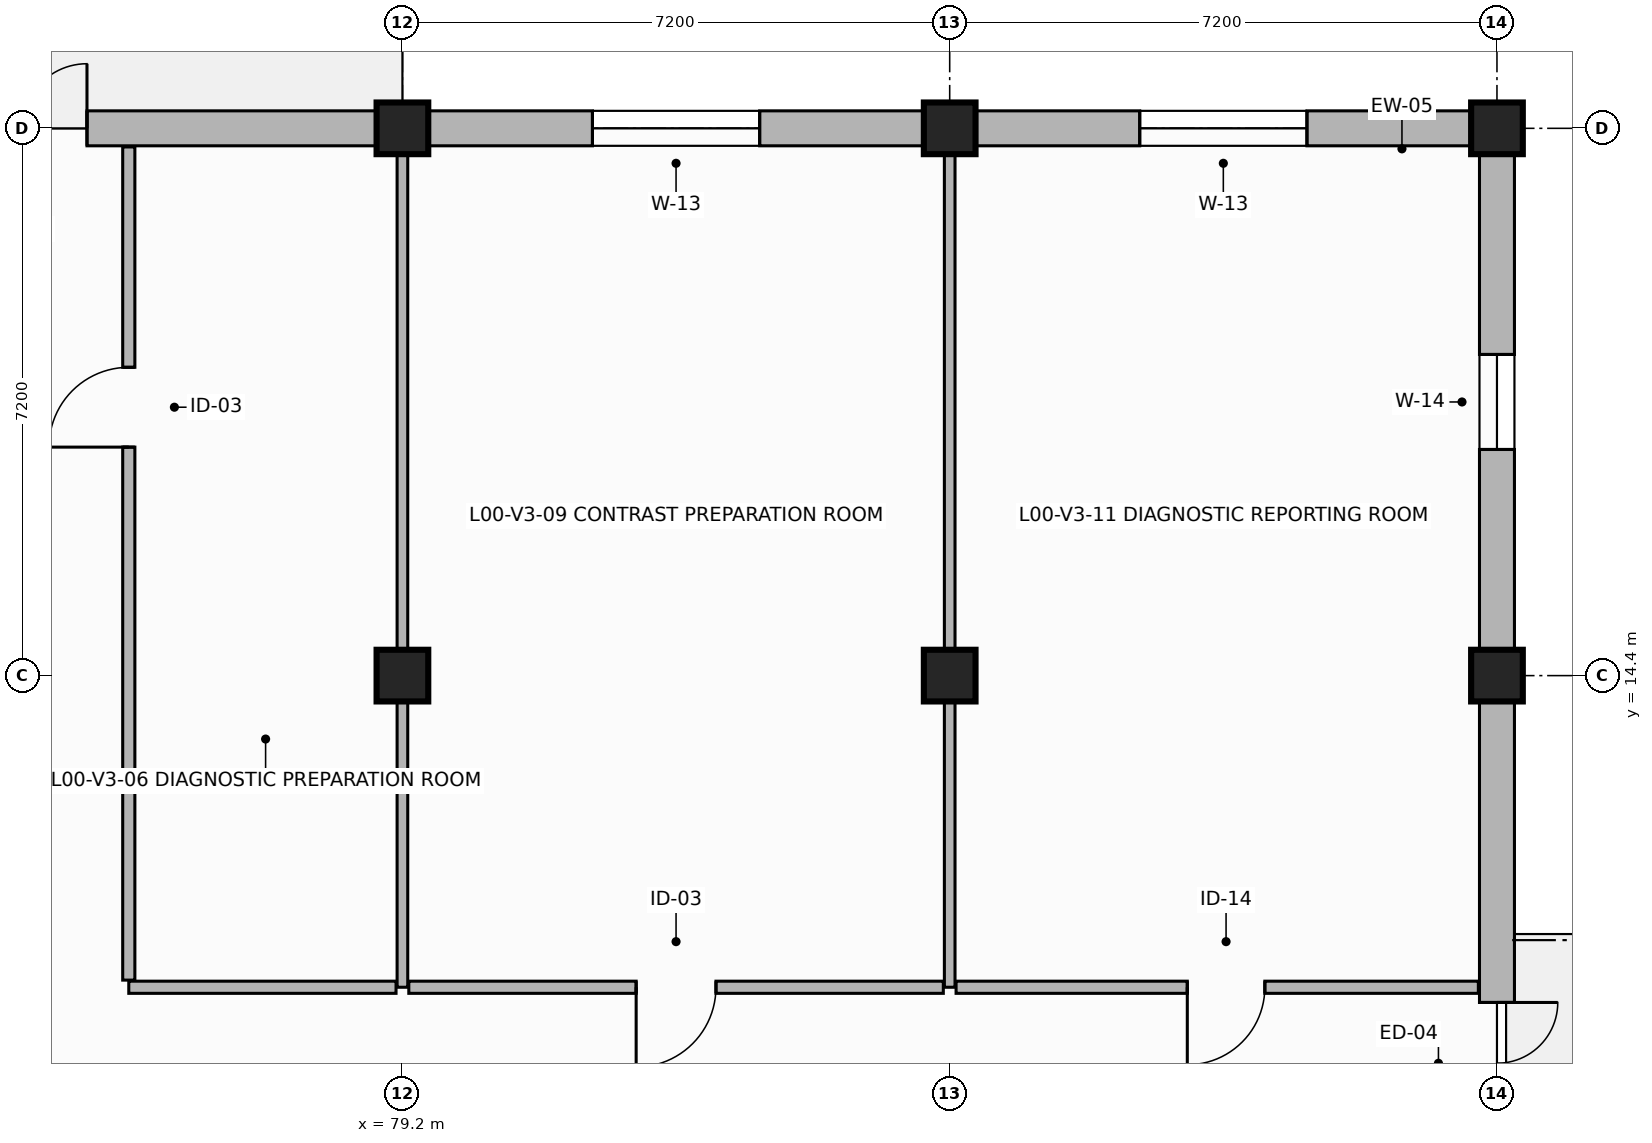
"""IFC4 building model, lengths in metres.
Left out: names, types, materials, properties, quantities, classifications, styles, units other than length and angle.
Written with IfcOpenShell. Run it as: python <this file> out.ifc"""

import sys

from ifc_helpers import new_model, si_unit, direction, frame, frame_2d, origin, origin_2d, place, context, subcontext, project, spatial, rectangle, extrude, element, fill, save


model = new_model("IFC4")
c1 = context("Model", 3, precision=1e-05, world=origin(), true_north=direction((0.0, 1.0)))
c2 = subcontext(c1, "Body", "Model", "MODEL_VIEW")
j1 = project(units=[si_unit("LENGTHUNIT", "METRE"), si_unit("PLANEANGLEUNIT", "RADIAN")], contexts=[c1])
p1 = place(None, origin())
s1 = spatial("IfcSite", under=j1, at=p1, CompositionType="ELEMENT")
p2 = place(p1, origin())
s2 = spatial("IfcBuilding", under=s1, at=p2, CompositionType="ELEMENT")
p3 = place(p2, origin())
s3 = spatial("IfcBuildingStorey", under=s2, at=p3, CompositionType="ELEMENT", Elevation=0.0)
for number, where, z_axis, x_axis in (
    (1, (79.2, 14.4, 0.0), (0.0, 0.0, 1.0), (1.0, 0.0, 0.0)),
    (2, (79.2, 21.6, 0.0), (0.0, 0.0, 1.0), (1.0, 0.0, 0.0)),
    (3, (86.4, 14.4, 0.0), (0.0, 0.0, 1.0), (1.0, 0.0, 0.0)),
    (4, (86.4, 21.6, 0.0), (0.0, 0.0, 1.0), (1.0, 0.0, 0.0)),
    (5, (93.6, 14.4, 0.0), (0.0, 0.0, 1.0), (1.0, 0.0, 0.0)),
    (6, (93.6, 21.6, 0.0), (0.0, 0.0, 1.0), (1.0, 0.0, 0.0)),
):
    element("IfcColumn", number, at=place(p3, frame(where, z_axis=z_axis, x_axis=x_axis)), inside=s3, PredefinedType="COLUMN", context=c2, shape_type="SweptSolid", body=[
        extrude(rectangle(XDim=0.68, YDim=0.68, at=origin_2d()), origin(), (0.0, 0.0, 1.0), 4.15),
    ])
p4 = place(p3, frame((93.6, 7.2, 0.0), z_axis=(0.0, 0.0, 1.0), x_axis=(0.0, 1.0, 0.0)))
e7 = element("IfcWall", 7, at=p4, inside=s3, PredefinedType="SOLIDWALL", context=c2, shape_type="SweptSolid", body=[
    extrude(rectangle(XDim=7.2, YDim=0.46, at=frame_2d((3.6, 0.0))), origin(), (0.0, 0.0, 1.0), 3.43),
])
p5 = place(p4, frame((1.3, 0.0, 0.0)))
e8 = element("IfcOpeningElement", 8, at=p5, cuts=e7, PredefinedType="OPENING", context=c2, shape_type="SweptSolid", body=[
    extrude(rectangle(XDim=1.6, YDim=2.4, at=frame_2d((0.8, 1.2))), frame((0.0, 0.24, 0.0), z_axis=(0.0, -1.0, 0.0), x_axis=(1.0, 0.0, 0.0)), (0.0, 0.0, 1.0), 0.48),
])
p6 = place(p3, frame((93.6, 14.4, 0.0), z_axis=(0.0, 0.0, 1.0), x_axis=(0.0, 1.0, 0.0)))
e9 = element("IfcWall", 9, at=p6, inside=s3, PredefinedType="SOLIDWALL", context=c2, shape_type="SweptSolid", body=[
    extrude(rectangle(XDim=7.2, YDim=0.46, at=frame_2d((3.6, 0.0))), origin(), (0.0, 0.0, 1.0), 3.43),
])
p7 = place(p6, frame((2.975, 0.0, 1.2)))
e10 = element("IfcOpeningElement", 10, at=p7, cuts=e9, PredefinedType="OPENING", context=c2, shape_type="SweptSolid", body=[
    extrude(rectangle(XDim=1.25, YDim=1.35, at=frame_2d((0.625, 0.675))), frame((0.0, 0.24, 0.0), z_axis=(0.0, -1.0, 0.0), x_axis=(1.0, 0.0, 0.0)), (0.0, 0.0, 1.0), 0.48),
])
p8 = place(p3, frame((93.6, 21.6, 0.0), z_axis=(0.0, 0.0, 1.0), x_axis=(-1.0, 0.0, 0.0)))
e11 = element("IfcWall", 11, at=p8, inside=s3, PredefinedType="SOLIDWALL", context=c2, shape_type="SweptSolid", body=[
    extrude(rectangle(XDim=7.2, YDim=0.46, at=frame_2d((3.6, 0.0))), origin(), (0.0, 0.0, 1.0), 3.43),
])
p9 = place(p8, frame((2.5, 0.0, 1.2)))
e12 = element("IfcOpeningElement", 12, at=p9, cuts=e11, PredefinedType="OPENING", context=c2, shape_type="SweptSolid", body=[
    extrude(rectangle(XDim=2.2, YDim=1.1, at=frame_2d((1.1, 0.55))), frame((0.0, 0.24, 0.0), z_axis=(0.0, -1.0, 0.0), x_axis=(1.0, 0.0, 0.0)), (0.0, 0.0, 1.0), 0.48),
])
p10 = place(p3, frame((86.4, 21.6, 0.0), z_axis=(0.0, 0.0, 1.0), x_axis=(-1.0, 0.0, 0.0)))
e13 = element("IfcWall", 13, at=p10, inside=s3, PredefinedType="SOLIDWALL", context=c2, shape_type="SweptSolid", body=[
    extrude(rectangle(XDim=7.2, YDim=0.46, at=frame_2d((3.6, 0.0))), origin(), (0.0, 0.0, 1.0), 3.43),
])
p11 = place(p10, frame((2.5, 0.0, 1.2)))
e14 = element("IfcOpeningElement", 14, at=p11, cuts=e13, PredefinedType="OPENING", context=c2, shape_type="SweptSolid", body=[
    extrude(rectangle(XDim=2.2, YDim=1.1, at=frame_2d((1.1, 0.55))), frame((0.0, 0.24, 0.0), z_axis=(0.0, -1.0, 0.0), x_axis=(1.0, 0.0, 0.0)), (0.0, 0.0, 1.0), 0.48),
])
p12 = place(p3, frame((79.2, 21.6, 0.0), z_axis=(0.0, 0.0, 1.0), x_axis=(-1.0, 0.0, 0.0)))
e15 = element("IfcWall", 15, at=p12, inside=s3, PredefinedType="SOLIDWALL", context=c2, shape_type="SweptSolid", body=[
    extrude(rectangle(XDim=7.2, YDim=0.46, at=frame_2d((3.6, 0.0))), origin(), (0.0, 0.0, 1.0), 3.43),
])
p13 = place(p12, frame((4.15, 0.0, 0.0)))
e16 = element("IfcOpeningElement", 16, at=p13, cuts=e15, PredefinedType="OPENING", context=c2, shape_type="SweptSolid", body=[
    extrude(rectangle(XDim=1.7, YDim=2.45, at=frame_2d((0.85, 1.225))), frame((0.0, 0.24, 0.0), z_axis=(0.0, -1.0, 0.0), x_axis=(1.0, 0.0, 0.0)), (0.0, 0.0, 1.0), 0.48),
])
p14 = place(p3, frame((79.2, 21.355, 0.0), z_axis=(0.0, 0.0, 1.0), x_axis=(0.0, -1.0, 0.0)))
e17 = element("IfcWall", 17, at=p14, inside=s3, PredefinedType="PARTITIONING", context=c2, shape_type="SweptSolid", body=[
    extrude(rectangle(XDim=11.055, YDim=0.14, at=frame_2d((5.527, 0.0))), origin(), (0.0, 0.0, 1.0), 3.41),
])
p15 = place(p3, frame((79.116, 10.3, 0.0), z_axis=(0.0, 0.0, 1.0), x_axis=(-1.0, 0.0, 0.0)))
e18 = element("IfcWall", 18, at=p15, inside=s3, PredefinedType="PARTITIONING", context=c2, shape_type="SweptSolid", body=[
    extrude(rectangle(XDim=3.516, YDim=0.16, at=frame_2d((1.758, 0.0))), origin(), (0.0, 0.0, 1.0), 3.41),
])
p16 = place(p3, frame((75.6, 10.394, 0.0), z_axis=(0.0, 0.0, 1.0), x_axis=(0.0, 1.0, 0.0)))
e19 = element("IfcWall", 19, at=p16, inside=s3, PredefinedType="PARTITIONING", context=c2, shape_type="SweptSolid", body=[
    extrude(rectangle(XDim=10.961, YDim=0.16, at=frame_2d((5.48, 0.0))), origin(), (0.0, 0.0, 1.0), 3.41),
])
p17 = place(p16, frame((7.012, 0.0, 0.0)))
e20 = element("IfcOpeningElement", 20, at=p17, cuts=e19, PredefinedType="OPENING", context=c2, shape_type="SweptSolid", body=[
    extrude(rectangle(XDim=1.05, YDim=2.15, at=frame_2d((0.525, 1.075))), frame((0.0, 0.09, 0.0), z_axis=(0.0, -1.0, 0.0), x_axis=(1.0, 0.0, 0.0)), (0.0, 0.0, 1.0), 0.18),
])
p18 = place(p3, frame((86.4, 21.355, 0.0), z_axis=(0.0, 0.0, 1.0), x_axis=(0.0, -1.0, 0.0)))
e21 = element("IfcWall", 21, at=p18, inside=s3, PredefinedType="PARTITIONING", context=c2, shape_type="SweptSolid", body=[
    extrude(rectangle(XDim=11.055, YDim=0.14, at=frame_2d((5.527, 0.0))), origin(), (0.0, 0.0, 1.0), 3.41),
])
p19 = place(p3, frame((86.316, 10.3, 0.0), z_axis=(0.0, 0.0, 1.0), x_axis=(-1.0, 0.0, 0.0)))
e22 = element("IfcWall", 22, at=p19, inside=s3, PredefinedType="PARTITIONING", context=c2, shape_type="SweptSolid", body=[
    extrude(rectangle(XDim=7.032, YDim=0.16, at=frame_2d((3.516, 0.0))), origin(), (0.0, 0.0, 1.0), 3.41),
])
p20 = place(p19, frame((2.991, 0.0, 0.0)))
e23 = element("IfcOpeningElement", 23, at=p20, cuts=e22, PredefinedType="OPENING", context=c2, shape_type="SweptSolid", body=[
    extrude(rectangle(XDim=1.05, YDim=2.15, at=frame_2d((0.525, 1.075))), frame((0.0, 0.09, 0.0), z_axis=(0.0, -1.0, 0.0), x_axis=(1.0, 0.0, 0.0)), (0.0, 0.0, 1.0), 0.18),
])
p21 = place(p3, frame((93.355, 10.3, 0.0), z_axis=(0.0, 0.0, 1.0), x_axis=(-1.0, 0.0, 0.0)))
e24 = element("IfcWall", 24, at=p21, inside=s3, PredefinedType="PARTITIONING", context=c2, shape_type="SweptSolid", body=[
    extrude(rectangle(XDim=6.871, YDim=0.16, at=frame_2d((3.436, 0.0))), origin(), (0.0, 0.0, 1.0), 3.41),
])
p22 = place(p21, frame((2.809, 0.0, 0.0)))
e25 = element("IfcOpeningElement", 25, at=p22, cuts=e24, PredefinedType="OPENING", context=c2, shape_type="SweptSolid", body=[
    extrude(rectangle(XDim=1.02, YDim=2.15, at=frame_2d((0.51, 1.075))), frame((0.0, 0.09, 0.0), z_axis=(0.0, -1.0, 0.0), x_axis=(1.0, 0.0, 0.0)), (0.0, 0.0, 1.0), 0.18),
])
p23 = place(p5, frame((1.6, 0.0, 0.0), z_axis=(0.0, 0.0, 1.0), x_axis=(-1.0, 0.0, 0.0)))
e26 = element("IfcDoor", 26, at=p23, inside=s3, OperationType="DOUBLE_DOOR_SINGLE_SWING", PredefinedType="DOOR", context=c2, shape_type="SweptSolid", body=[
    extrude(rectangle(XDim=1.6, YDim=2.4, at=frame_2d((0.8, 1.2))), frame((0.0, 0.025, 0.0), z_axis=(0.0, -1.0, 0.0), x_axis=(1.0, 0.0, 0.0)), (0.0, 0.0, 1.0), 0.05),
])
fill(e8, e26)
p24 = place(p7, origin())
e27 = element("IfcWindow", 27, at=p24, inside=s3, PartitioningType="SINGLE_PANEL", PredefinedType="WINDOW", context=c2, shape_type="SweptSolid", body=[
    extrude(rectangle(XDim=1.25, YDim=1.35, at=frame_2d((0.625, 0.675))), frame((0.0, 0.03, 0.0), z_axis=(0.0, -1.0, 0.0), x_axis=(1.0, 0.0, 0.0)), (0.0, 0.0, 1.0), 0.06),
])
fill(e10, e27)
p25 = place(p9, origin())
e28 = element("IfcWindow", 28, at=p25, inside=s3, PartitioningType="SINGLE_PANEL", PredefinedType="WINDOW", context=c2, shape_type="SweptSolid", body=[
    extrude(rectangle(XDim=2.2, YDim=1.1, at=frame_2d((1.1, 0.55))), frame((0.0, 0.03, 0.0), z_axis=(0.0, -1.0, 0.0), x_axis=(1.0, 0.0, 0.0)), (0.0, 0.0, 1.0), 0.06),
])
fill(e12, e28)
p26 = place(p11, origin())
e29 = element("IfcWindow", 29, at=p26, inside=s3, PartitioningType="SINGLE_PANEL", PredefinedType="WINDOW", context=c2, shape_type="SweptSolid", body=[
    extrude(rectangle(XDim=2.2, YDim=1.1, at=frame_2d((1.1, 0.55))), frame((0.0, 0.03, 0.0), z_axis=(0.0, -1.0, 0.0), x_axis=(1.0, 0.0, 0.0)), (0.0, 0.0, 1.0), 0.06),
])
fill(e14, e29)
p27 = place(p13, frame((1.7, 0.0, 0.0), z_axis=(0.0, 0.0, 1.0), x_axis=(-1.0, 0.0, 0.0)))
e30 = element("IfcDoor", 30, at=p27, inside=s3, OperationType="DOUBLE_DOOR_SINGLE_SWING", PredefinedType="DOOR", context=c2, shape_type="SweptSolid", body=[
    extrude(rectangle(XDim=1.7, YDim=2.45, at=frame_2d((0.85, 1.225))), frame((0.0, 0.025, 0.0), z_axis=(0.0, -1.0, 0.0), x_axis=(1.0, 0.0, 0.0)), (0.0, 0.0, 1.0), 0.05),
])
fill(e16, e30)
p28 = place(p17, origin())
e31 = element("IfcDoor", 31, at=p28, inside=s3, OperationType="SINGLE_SWING_LEFT", PredefinedType="DOOR", context=c2, shape_type="SweptSolid", body=[
    extrude(rectangle(XDim=1.05, YDim=2.15, at=frame_2d((0.525, 1.075))), frame((0.0, 0.025, 0.0), z_axis=(0.0, -1.0, 0.0), x_axis=(1.0, 0.0, 0.0)), (0.0, 0.0, 1.0), 0.05),
])
fill(e20, e31)
p29 = place(p20, origin())
e32 = element("IfcDoor", 32, at=p29, inside=s3, OperationType="SINGLE_SWING_RIGHT", PredefinedType="DOOR", context=c2, shape_type="SweptSolid", body=[
    extrude(rectangle(XDim=1.05, YDim=2.15, at=frame_2d((0.525, 1.075))), frame((0.0, 0.025, 0.0), z_axis=(0.0, -1.0, 0.0), x_axis=(1.0, 0.0, 0.0)), (0.0, 0.0, 1.0), 0.05),
])
fill(e23, e32)
p30 = place(p22, origin())
e33 = element("IfcDoor", 33, at=p30, inside=s3, OperationType="SINGLE_SWING_RIGHT", PredefinedType="DOOR", context=c2, shape_type="SweptSolid", body=[
    extrude(rectangle(XDim=1.02, YDim=2.15, at=frame_2d((0.51, 1.075))), frame((0.0, 0.025, 0.0), z_axis=(0.0, -1.0, 0.0), x_axis=(1.0, 0.0, 0.0)), (0.0, 0.0, 1.0), 0.05),
])
fill(e25, e33)
save(model, sys.argv[1])
